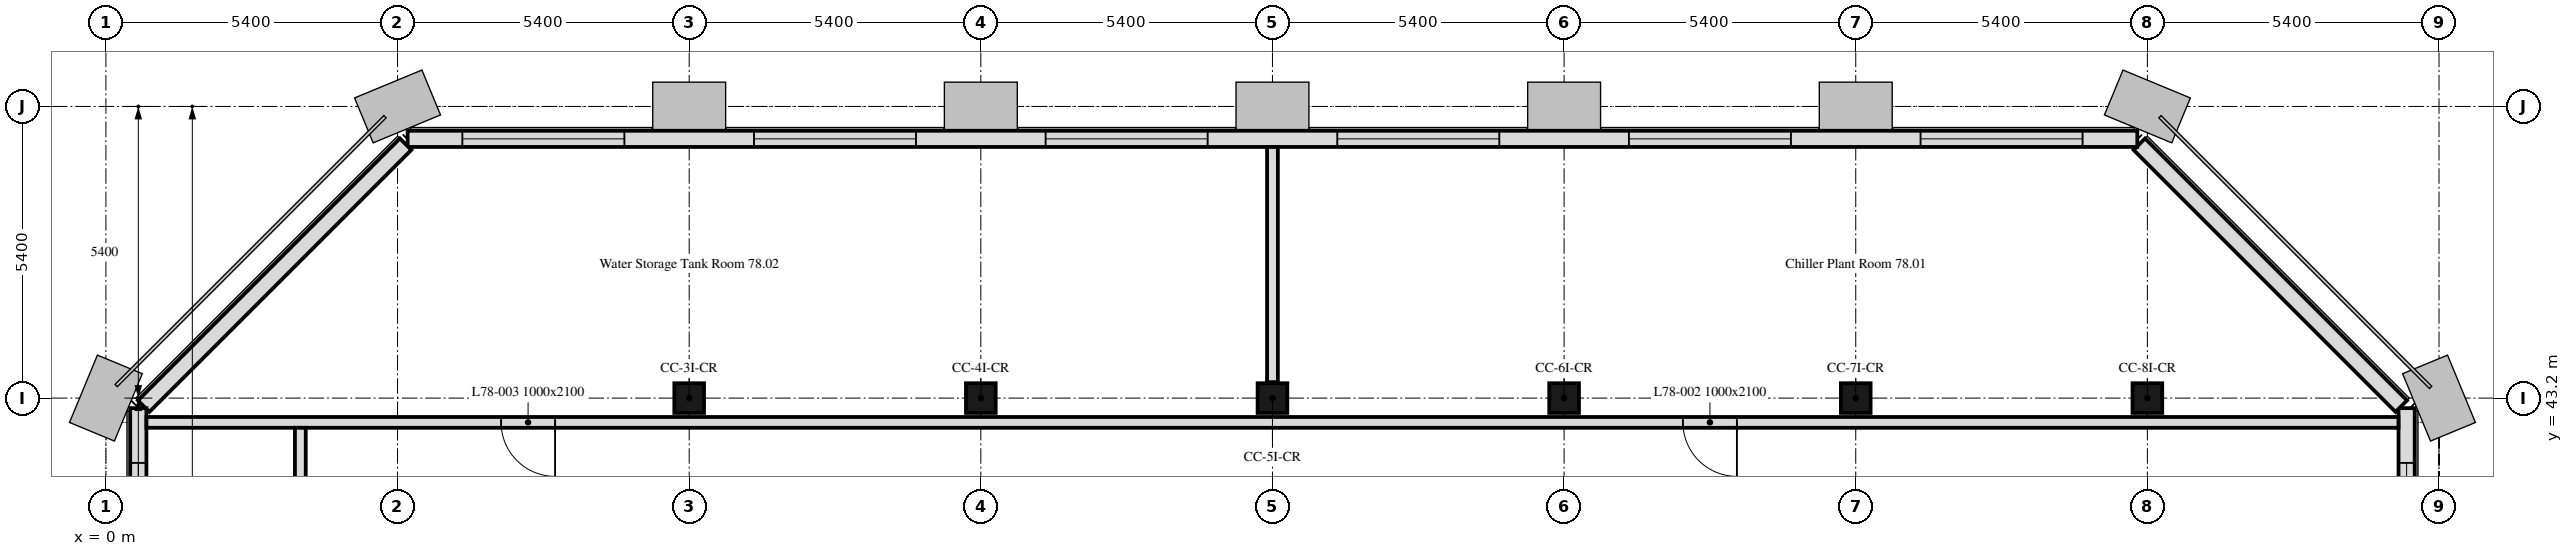
"""IFC4 building model, lengths in metres.
Left out: names, types, materials, properties, quantities, classifications, styles, units other than length and angle.
Written with IfcOpenShell. Run it as: python <this file> out.ifc"""

import sys

from ifc_helpers import new_model, si_unit, direction, frame, frame_2d, origin, origin_2d, place, context, subcontext, project, spatial, polyline, rectangle, outline, extrude, element, fill, save


model = new_model("IFC4")
c1 = context("Model", 3, precision=1e-05, world=origin(), true_north=direction((0.0, 1.0)))
c2 = subcontext(c1, "Body", "Model", "MODEL_VIEW")
j1 = project(units=[si_unit("LENGTHUNIT", "METRE"), si_unit("PLANEANGLEUNIT", "RADIAN")], contexts=[c1])
p1 = place(None, origin())
s1 = spatial("IfcSite", under=j1, at=p1, CompositionType="ELEMENT")
p2 = place(p1, origin())
s2 = spatial("IfcBuilding", under=s1, at=p2, CompositionType="ELEMENT")
p3 = place(p2, frame((0.0, 0.0, 312.7)))
s3 = spatial("IfcBuildingStorey", under=s2, at=p3, CompositionType="ELEMENT", Elevation=312.7)
for number, where, z_axis, x_axis in (
    (1, (10.8, 43.2, 0.0), (0.0, 0.0, 1.0), (1.0, 0.0, 0.0)),
    (2, (16.2, 43.2, 0.0), (0.0, 0.0, 1.0), (1.0, 0.0, 0.0)),
    (3, (21.6, 43.2, 0.0), (0.0, 0.0, 1.0), (1.0, 0.0, 0.0)),
    (4, (27.0, 43.2, 0.0), (0.0, 0.0, 1.0), (1.0, 0.0, 0.0)),
    (5, (32.4, 43.2, 0.0), (0.0, 0.0, 1.0), (1.0, 0.0, 0.0)),
    (6, (37.8, 43.2, 0.0), (0.0, 0.0, 1.0), (1.0, 0.0, 0.0)),
):
    element("IfcColumn", number, at=place(p3, frame(where, z_axis=z_axis, x_axis=x_axis)), inside=s3, PredefinedType="COLUMN", context=c2, shape_type="SweptSolid", body=[
        extrude(rectangle(XDim=0.55, YDim=0.55, at=origin_2d()), origin(), (0.0, 0.0, 1.0), 4.2),
    ])
p4 = place(p3, frame((42.6, 32.4, 0.0), z_axis=(0.0, 0.0, 1.0), x_axis=(0.0, 1.0, 0.0)))
e7 = element("IfcWall", 7, at=p4, inside=s3, PredefinedType="SOLIDWALL", context=c2, shape_type="SweptSolid", body=[
    extrude(outline(polyline([(0.0, 0.0), (10.614, 0.0), (10.614, 4.2), (10.024, 4.2), (9.434, 4.2), (8.845, 4.2), (8.255, 4.2), (7.665, 4.2), (7.076, 4.2), (6.486, 4.2), (5.896, 4.2), (5.307, 4.2), (4.717, 4.2), (4.127, 4.2), (3.538, 4.2), (2.948, 4.2), (2.359, 4.2), (1.769, 4.2), (1.179, 4.2), (0.59, 4.2), (0.0, 4.2), (0.0, 0.0)])), frame((0.0, 0.15, 0.0), z_axis=(0.0, -1.0, 0.0), x_axis=(1.0, 0.0, 0.0)), (0.0, 0.0, 1.0), 0.3),
])
p5 = place(p4, frame((1.2, 0.0, 0.6)))
e8 = element("IfcOpeningElement", 8, at=p5, cuts=e7, PredefinedType="OPENING", context=c2, shape_type="SweptSolid", body=[
    extrude(rectangle(XDim=3.0, YDim=1.8, at=frame_2d((1.5, 0.9))), frame((0.0, 0.16, 0.0), z_axis=(0.0, -1.0, 0.0), x_axis=(1.0, 0.0, 0.0)), (0.0, 0.0, 1.0), 0.32),
])
p6 = place(p4, frame((6.6, 0.0, 0.6)))
e9 = element("IfcOpeningElement", 9, at=p6, cuts=e7, PredefinedType="OPENING", context=c2, shape_type="SweptSolid", body=[
    extrude(rectangle(XDim=3.0, YDim=1.8, at=frame_2d((1.5, 0.9))), frame((0.0, 0.16, 0.0), z_axis=(0.0, -1.0, 0.0), x_axis=(1.0, 0.0, 0.0)), (0.0, 0.0, 1.0), 0.32),
])
p7 = place(p3, frame((42.501, 43.051, 0.0), z_axis=(0.0, 0.0, 1.0), x_axis=(-0.707106781187, 0.707106781187, 0.0)))
e10 = element("IfcWall", 10, at=p7, inside=s3, PredefinedType="SOLIDWALL", context=c2, shape_type="SweptSolid", body=[
    extrude(outline(polyline([(0.0, 0.0), (6.86, 0.0), (6.86, 4.2), (6.288, 4.2), (5.716, 4.2), (5.145, 4.2), (4.573, 4.2), (4.001, 4.2), (3.43, 4.2), (2.858, 4.2), (2.287, 4.2), (1.715, 4.2), (1.143, 4.2), (0.572, 4.2), (0.0, 4.2), (0.0, 0.0)])), frame((0.0, 0.15, 0.0), z_axis=(0.0, -1.0, 0.0), x_axis=(1.0, 0.0, 0.0)), (0.0, 0.0, 1.0), 0.3),
])
p8 = place(p3, frame((37.614, 48.0, 0.0), z_axis=(0.0, 0.0, 1.0), x_axis=(-1.0, 0.0, 0.0)))
e11 = element("IfcWall", 11, at=p8, inside=s3, PredefinedType="SOLIDWALL", context=c2, shape_type="SweptSolid", body=[
    extrude(outline(polyline([(0.0, 0.0), (32.027, 0.0), (32.027, 4.2), (31.434, 4.2), (30.841, 4.2), (30.248, 4.2), (29.655, 4.2), (29.062, 4.2), (28.469, 4.2), (27.875, 4.2), (27.282, 4.2), (26.689, 4.2), (26.096, 4.2), (25.503, 4.2), (24.91, 4.2), (24.317, 4.2), (23.724, 4.2), (23.131, 4.2), (22.538, 4.2), (21.945, 4.2), (21.352, 4.2), (20.758, 4.2), (20.165, 4.2), (19.572, 4.2), (18.979, 4.2), (18.386, 4.2), (17.793, 4.2), (17.2, 4.2), (16.607, 4.2), (16.014, 4.2), (15.42, 4.2), (14.827, 4.2), (14.234, 4.2), (13.641, 4.2), (13.048, 4.2), (12.455, 4.2), (11.862, 4.2), (11.269, 4.2), (10.676, 4.2), (10.083, 4.2), (9.49, 4.2), (8.896, 4.2), (8.303, 4.2), (7.71, 4.2), (7.117, 4.2), (6.524, 4.2), (5.931, 4.2), (5.338, 4.2), (4.745, 4.2), (4.152, 4.2), (3.559, 4.2), (2.966, 4.2), (2.372, 4.2), (1.779, 4.2), (1.186, 4.2), (0.593, 4.2), (0.0, 4.2), (0.0, 0.0)])), frame((0.0, 0.15, 0.0), z_axis=(0.0, -1.0, 0.0), x_axis=(1.0, 0.0, 0.0)), (0.0, 0.0, 1.0), 0.3),
])
p9 = place(p8, frame((1.014, 0.0, 0.6)))
e12 = element("IfcOpeningElement", 12, at=p9, cuts=e11, PredefinedType="OPENING", context=c2, shape_type="SweptSolid", body=[
    extrude(rectangle(XDim=3.0, YDim=1.8, at=frame_2d((1.5, 0.9))), frame((0.0, 0.16, 0.0), z_axis=(0.0, -1.0, 0.0), x_axis=(1.0, 0.0, 0.0)), (0.0, 0.0, 1.0), 0.32),
])
p10 = place(p8, frame((6.414, 0.0, 0.6)))
e13 = element("IfcOpeningElement", 13, at=p10, cuts=e11, PredefinedType="OPENING", context=c2, shape_type="SweptSolid", body=[
    extrude(rectangle(XDim=3.0, YDim=1.8, at=frame_2d((1.5, 0.9))), frame((0.0, 0.16, 0.0), z_axis=(0.0, -1.0, 0.0), x_axis=(1.0, 0.0, 0.0)), (0.0, 0.0, 1.0), 0.32),
])
p11 = place(p8, frame((11.814, 0.0, 0.6)))
e14 = element("IfcOpeningElement", 14, at=p11, cuts=e11, PredefinedType="OPENING", context=c2, shape_type="SweptSolid", body=[
    extrude(rectangle(XDim=3.0, YDim=1.8, at=frame_2d((1.5, 0.9))), frame((0.0, 0.16, 0.0), z_axis=(0.0, -1.0, 0.0), x_axis=(1.0, 0.0, 0.0)), (0.0, 0.0, 1.0), 0.32),
])
p12 = place(p8, frame((17.214, 0.0, 0.6)))
e15 = element("IfcOpeningElement", 15, at=p12, cuts=e11, PredefinedType="OPENING", context=c2, shape_type="SweptSolid", body=[
    extrude(rectangle(XDim=3.0, YDim=1.8, at=frame_2d((1.5, 0.9))), frame((0.0, 0.16, 0.0), z_axis=(0.0, -1.0, 0.0), x_axis=(1.0, 0.0, 0.0)), (0.0, 0.0, 1.0), 0.32),
])
p13 = place(p8, frame((22.614, 0.0, 0.6)))
e16 = element("IfcOpeningElement", 16, at=p13, cuts=e11, PredefinedType="OPENING", context=c2, shape_type="SweptSolid", body=[
    extrude(rectangle(XDim=3.0, YDim=1.8, at=frame_2d((1.5, 0.9))), frame((0.0, 0.16, 0.0), z_axis=(0.0, -1.0, 0.0), x_axis=(1.0, 0.0, 0.0)), (0.0, 0.0, 1.0), 0.32),
])
p14 = place(p8, frame((28.014, 0.0, 0.6)))
e17 = element("IfcOpeningElement", 17, at=p14, cuts=e11, PredefinedType="OPENING", context=c2, shape_type="SweptSolid", body=[
    extrude(rectangle(XDim=3.0, YDim=1.8, at=frame_2d((1.5, 0.9))), frame((0.0, 0.16, 0.0), z_axis=(0.0, -1.0, 0.0), x_axis=(1.0, 0.0, 0.0)), (0.0, 0.0, 1.0), 0.32),
])
p15 = place(p3, frame((5.55, 47.901, 0.0), z_axis=(0.0, 0.0, 1.0), x_axis=(-0.707106781187, -0.707106781187, 0.0)))
e18 = element("IfcWall", 18, at=p15, inside=s3, PredefinedType="SOLIDWALL", context=c2, shape_type="SweptSolid", body=[
    extrude(outline(polyline([(0.0, 0.0), (6.86, 0.0), (6.86, 4.2), (6.288, 4.2), (5.716, 4.2), (5.145, 4.2), (4.573, 4.2), (4.001, 4.2), (3.43, 4.2), (2.858, 4.2), (2.287, 4.2), (1.715, 4.2), (1.143, 4.2), (0.572, 4.2), (0.0, 4.2), (0.0, 0.0)])), frame((0.0, 0.15, 0.0), z_axis=(0.0, -1.0, 0.0), x_axis=(1.0, 0.0, 0.0)), (0.0, 0.0, 1.0), 0.3),
])
p16 = place(p3, frame((0.6, 43.014, 0.0), z_axis=(0.0, 0.0, 1.0), x_axis=(0.0, -1.0, 0.0)))
e19 = element("IfcWall", 19, at=p16, inside=s3, PredefinedType="SOLIDWALL", context=c2, shape_type="SweptSolid", body=[
    extrude(outline(polyline([(0.0, 0.0), (32.027, 0.0), (32.027, 4.2), (31.434, 4.2), (30.841, 4.2), (30.248, 4.2), (29.655, 4.2), (29.062, 4.2), (28.469, 4.2), (27.875, 4.2), (27.282, 4.2), (26.689, 4.2), (26.096, 4.2), (25.503, 4.2), (24.91, 4.2), (24.317, 4.2), (23.724, 4.2), (23.131, 4.2), (22.538, 4.2), (21.945, 4.2), (21.352, 4.2), (20.758, 4.2), (20.165, 4.2), (19.572, 4.2), (18.979, 4.2), (18.386, 4.2), (17.793, 4.2), (17.2, 4.2), (16.607, 4.2), (16.014, 4.2), (15.42, 4.2), (14.827, 4.2), (14.234, 4.2), (13.641, 4.2), (13.048, 4.2), (12.455, 4.2), (11.862, 4.2), (11.269, 4.2), (10.676, 4.2), (10.083, 4.2), (9.49, 4.2), (8.896, 4.2), (8.303, 4.2), (7.71, 4.2), (7.117, 4.2), (6.524, 4.2), (5.931, 4.2), (5.338, 4.2), (4.745, 4.2), (4.152, 4.2), (3.559, 4.2), (2.966, 4.2), (2.372, 4.2), (1.779, 4.2), (1.186, 4.2), (0.593, 4.2), (0.0, 4.2), (0.0, 0.0)])), frame((0.0, 0.15, 0.0), z_axis=(0.0, -1.0, 0.0), x_axis=(1.0, 0.0, 0.0)), (0.0, 0.0, 1.0), 0.3),
])
p17 = place(p16, frame((1.014, 0.0, 0.6)))
e20 = element("IfcOpeningElement", 20, at=p17, cuts=e19, PredefinedType="OPENING", context=c2, shape_type="SweptSolid", body=[
    extrude(rectangle(XDim=3.0, YDim=1.8, at=frame_2d((1.5, 0.9))), frame((0.0, 0.16, 0.0), z_axis=(0.0, -1.0, 0.0), x_axis=(1.0, 0.0, 0.0)), (0.0, 0.0, 1.0), 0.32),
])
p18 = place(p16, frame((6.414, 0.0, 0.6)))
e21 = element("IfcOpeningElement", 21, at=p18, cuts=e19, PredefinedType="OPENING", context=c2, shape_type="SweptSolid", body=[
    extrude(rectangle(XDim=3.0, YDim=1.8, at=frame_2d((1.5, 0.9))), frame((0.0, 0.16, 0.0), z_axis=(0.0, -1.0, 0.0), x_axis=(1.0, 0.0, 0.0)), (0.0, 0.0, 1.0), 0.32),
])
p19 = place(p16, frame((11.814, 0.0, 0.6)))
e22 = element("IfcOpeningElement", 22, at=p19, cuts=e19, PredefinedType="OPENING", context=c2, shape_type="SweptSolid", body=[
    extrude(rectangle(XDim=3.0, YDim=1.8, at=frame_2d((1.5, 0.9))), frame((0.0, 0.16, 0.0), z_axis=(0.0, -1.0, 0.0), x_axis=(1.0, 0.0, 0.0)), (0.0, 0.0, 1.0), 0.32),
])
p20 = place(p16, frame((17.214, 0.0, 0.6)))
e23 = element("IfcOpeningElement", 23, at=p20, cuts=e19, PredefinedType="OPENING", context=c2, shape_type="SweptSolid", body=[
    extrude(rectangle(XDim=3.0, YDim=1.8, at=frame_2d((1.5, 0.9))), frame((0.0, 0.16, 0.0), z_axis=(0.0, -1.0, 0.0), x_axis=(1.0, 0.0, 0.0)), (0.0, 0.0, 1.0), 0.32),
])
p21 = place(p16, frame((22.614, 0.0, 0.6)))
e24 = element("IfcOpeningElement", 24, at=p21, cuts=e19, PredefinedType="OPENING", context=c2, shape_type="SweptSolid", body=[
    extrude(rectangle(XDim=3.0, YDim=1.8, at=frame_2d((1.5, 0.9))), frame((0.0, 0.16, 0.0), z_axis=(0.0, -1.0, 0.0), x_axis=(1.0, 0.0, 0.0)), (0.0, 0.0, 1.0), 0.32),
])
p22 = place(p16, frame((28.014, 0.0, 0.6)))
e25 = element("IfcOpeningElement", 25, at=p22, cuts=e19, PredefinedType="OPENING", context=c2, shape_type="SweptSolid", body=[
    extrude(rectangle(XDim=3.0, YDim=1.8, at=frame_2d((1.5, 0.9))), frame((0.0, 0.16, 0.0), z_axis=(0.0, -1.0, 0.0), x_axis=(1.0, 0.0, 0.0)), (0.0, 0.0, 1.0), 0.32),
])
p23 = place(p3, frame((21.6, 47.849, 0.0), z_axis=(0.0, 0.0, 1.0), x_axis=(0.0, -1.0, 0.0)))
e26 = element("IfcWall", 26, at=p23, inside=s3, PredefinedType="PARTITIONING", context=c2, shape_type="SweptSolid", body=[
    extrude(rectangle(XDim=4.354, YDim=0.2, at=frame_2d((2.177, 0.0))), origin(), (0.0, 0.0, 1.0), 3.45),
])
p24 = place(p3, frame((42.449, 42.75, 0.0), z_axis=(0.0, 0.0, 1.0), x_axis=(-1.0, 0.0, 0.0)))
e27 = element("IfcWall", 27, at=p24, inside=s3, PredefinedType="PARTITIONING", context=c2, shape_type="SweptSolid", body=[
    extrude(rectangle(XDim=41.698, YDim=0.2, at=frame_2d((20.849, 0.0))), origin(), (0.0, 0.0, 1.0), 3.45),
])
p25 = place(p24, frame((12.249, 0.0, 0.0)))
e28 = element("IfcOpeningElement", 28, at=p25, cuts=e27, PredefinedType="OPENING", context=c2, shape_type="SweptSolid", body=[
    extrude(rectangle(XDim=1.0, YDim=2.1, at=frame_2d((0.5, 1.05))), frame((0.0, 0.1, 0.0), z_axis=(0.0, -1.0, 0.0), x_axis=(1.0, 0.0, 0.0)), (0.0, 0.0, 1.0), 0.2),
])
p26 = place(p24, frame((34.132, 0.0, 0.0)))
e29 = element("IfcOpeningElement", 29, at=p26, cuts=e27, PredefinedType="OPENING", context=c2, shape_type="SweptSolid", body=[
    extrude(rectangle(XDim=1.0, YDim=2.1, at=frame_2d((0.5, 1.05))), frame((0.0, 0.1, 0.0), z_axis=(0.0, -1.0, 0.0), x_axis=(1.0, 0.0, 0.0)), (0.0, 0.0, 1.0), 0.2),
])
p27 = place(p3, frame((3.6, 11.35, 0.0), z_axis=(0.0, 0.0, 1.0), x_axis=(0.0, 1.0, 0.0)))
e30 = element("IfcWall", 30, at=p27, inside=s3, PredefinedType="PARTITIONING", context=c2, shape_type="SweptSolid", body=[
    extrude(rectangle(XDim=31.3, YDim=0.2, at=frame_2d((15.65, 0.0))), origin(), (0.0, 0.0, 1.0), 3.45),
])
p28 = place(p27, frame((23.537, 0.0, 0.0)))
e31 = element("IfcOpeningElement", 31, at=p28, cuts=e30, PredefinedType="OPENING", context=c2, shape_type="SweptSolid", body=[
    extrude(rectangle(XDim=1.0, YDim=2.1, at=frame_2d((0.5, 1.05))), frame((0.0, 0.1, 0.0), z_axis=(0.0, -1.0, 0.0), x_axis=(1.0, 0.0, 0.0)), (0.0, 0.0, 1.0), 0.2),
])
p29 = place(p27, frame((17.85, 0.0, 0.0)))
e32 = element("IfcOpeningElement", 32, at=p29, cuts=e30, PredefinedType="OPENING", context=c2, shape_type="SweptSolid", body=[
    extrude(rectangle(XDim=1.0, YDim=2.1, at=frame_2d((0.5, 1.05))), frame((0.0, 0.1, 0.0), z_axis=(0.0, -1.0, 0.0), x_axis=(1.0, 0.0, 0.0)), (0.0, 0.0, 1.0), 0.2),
])
p30 = place(p27, frame((1.875, 0.0, 0.0)))
e33 = element("IfcOpeningElement", 33, at=p30, cuts=e30, PredefinedType="OPENING", context=c2, shape_type="SweptSolid", body=[
    extrude(rectangle(XDim=1.0, YDim=2.1, at=frame_2d((0.5, 1.05))), frame((0.0, 0.1, 0.0), z_axis=(0.0, -1.0, 0.0), x_axis=(1.0, 0.0, 0.0)), (0.0, 0.0, 1.0), 0.2),
])
p31 = place(p27, frame((9.75, 0.0, 0.0)))
e34 = element("IfcOpeningElement", 34, at=p31, cuts=e30, PredefinedType="OPENING", context=c2, shape_type="SweptSolid", body=[
    extrude(rectangle(XDim=1.0, YDim=2.1, at=frame_2d((0.5, 1.05))), frame((0.0, 0.1, 0.0), z_axis=(0.0, -1.0, 0.0), x_axis=(1.0, 0.0, 0.0)), (0.0, 0.0, 1.0), 0.2),
])
p32 = place(p6, origin())
e35 = element("IfcWindow", 35, at=p32, inside=s3, PartitioningType="SINGLE_PANEL", PredefinedType="WINDOW", context=c2, shape_type="SweptSolid", body=[
    extrude(rectangle(XDim=3.0, YDim=1.8, at=frame_2d((1.5, 0.9))), frame((0.0, 0.03, 0.0), z_axis=(0.0, -1.0, 0.0), x_axis=(1.0, 0.0, 0.0)), (0.0, 0.0, 1.0), 0.06),
])
fill(e9, e35)
p33 = place(p9, origin())
e36 = element("IfcWindow", 36, at=p33, inside=s3, PartitioningType="SINGLE_PANEL", PredefinedType="WINDOW", context=c2, shape_type="SweptSolid", body=[
    extrude(rectangle(XDim=3.0, YDim=1.8, at=frame_2d((1.5, 0.9))), frame((0.0, 0.03, 0.0), z_axis=(0.0, -1.0, 0.0), x_axis=(1.0, 0.0, 0.0)), (0.0, 0.0, 1.0), 0.06),
])
fill(e12, e36)
p34 = place(p10, origin())
e37 = element("IfcWindow", 37, at=p34, inside=s3, PartitioningType="SINGLE_PANEL", PredefinedType="WINDOW", context=c2, shape_type="SweptSolid", body=[
    extrude(rectangle(XDim=3.0, YDim=1.8, at=frame_2d((1.5, 0.9))), frame((0.0, 0.03, 0.0), z_axis=(0.0, -1.0, 0.0), x_axis=(1.0, 0.0, 0.0)), (0.0, 0.0, 1.0), 0.06),
])
fill(e13, e37)
p35 = place(p11, origin())
e38 = element("IfcWindow", 38, at=p35, inside=s3, PartitioningType="SINGLE_PANEL", PredefinedType="WINDOW", context=c2, shape_type="SweptSolid", body=[
    extrude(rectangle(XDim=3.0, YDim=1.8, at=frame_2d((1.5, 0.9))), frame((0.0, 0.03, 0.0), z_axis=(0.0, -1.0, 0.0), x_axis=(1.0, 0.0, 0.0)), (0.0, 0.0, 1.0), 0.06),
])
fill(e14, e38)
p36 = place(p12, origin())
e39 = element("IfcWindow", 39, at=p36, inside=s3, PartitioningType="SINGLE_PANEL", PredefinedType="WINDOW", context=c2, shape_type="SweptSolid", body=[
    extrude(rectangle(XDim=3.0, YDim=1.8, at=frame_2d((1.5, 0.9))), frame((0.0, 0.03, 0.0), z_axis=(0.0, -1.0, 0.0), x_axis=(1.0, 0.0, 0.0)), (0.0, 0.0, 1.0), 0.06),
])
fill(e15, e39)
p37 = place(p13, origin())
e40 = element("IfcWindow", 40, at=p37, inside=s3, PartitioningType="SINGLE_PANEL", PredefinedType="WINDOW", context=c2, shape_type="SweptSolid", body=[
    extrude(rectangle(XDim=3.0, YDim=1.8, at=frame_2d((1.5, 0.9))), frame((0.0, 0.03, 0.0), z_axis=(0.0, -1.0, 0.0), x_axis=(1.0, 0.0, 0.0)), (0.0, 0.0, 1.0), 0.06),
])
fill(e16, e40)
p38 = place(p14, origin())
e41 = element("IfcWindow", 41, at=p38, inside=s3, PartitioningType="SINGLE_PANEL", PredefinedType="WINDOW", context=c2, shape_type="SweptSolid", body=[
    extrude(rectangle(XDim=3.0, YDim=1.8, at=frame_2d((1.5, 0.9))), frame((0.0, 0.03, 0.0), z_axis=(0.0, -1.0, 0.0), x_axis=(1.0, 0.0, 0.0)), (0.0, 0.0, 1.0), 0.06),
])
fill(e17, e41)
p39 = place(p17, origin())
e42 = element("IfcWindow", 42, at=p39, inside=s3, PartitioningType="SINGLE_PANEL", PredefinedType="WINDOW", context=c2, shape_type="SweptSolid", body=[
    extrude(rectangle(XDim=3.0, YDim=1.8, at=frame_2d((1.5, 0.9))), frame((0.0, 0.03, 0.0), z_axis=(0.0, -1.0, 0.0), x_axis=(1.0, 0.0, 0.0)), (0.0, 0.0, 1.0), 0.06),
])
fill(e20, e42)
p40 = place(p25, origin())
e43 = element("IfcDoor", 43, at=p40, inside=s3, OperationType="SINGLE_SWING_LEFT", PredefinedType="DOOR", context=c2, shape_type="SweptSolid", body=[
    extrude(rectangle(XDim=1.0, YDim=2.1, at=frame_2d((0.5, 1.05))), frame((0.0, 0.025, 0.0), z_axis=(0.0, -1.0, 0.0), x_axis=(1.0, 0.0, 0.0)), (0.0, 0.0, 1.0), 0.05),
])
fill(e28, e43)
p41 = place(p26, origin())
e44 = element("IfcDoor", 44, at=p41, inside=s3, OperationType="SINGLE_SWING_RIGHT", PredefinedType="DOOR", context=c2, shape_type="SweptSolid", body=[
    extrude(rectangle(XDim=1.0, YDim=2.1, at=frame_2d((0.5, 1.05))), frame((0.0, 0.025, 0.0), z_axis=(0.0, -1.0, 0.0), x_axis=(1.0, 0.0, 0.0)), (0.0, 0.0, 1.0), 0.05),
])
fill(e29, e44)
save(model, sys.argv[1])
